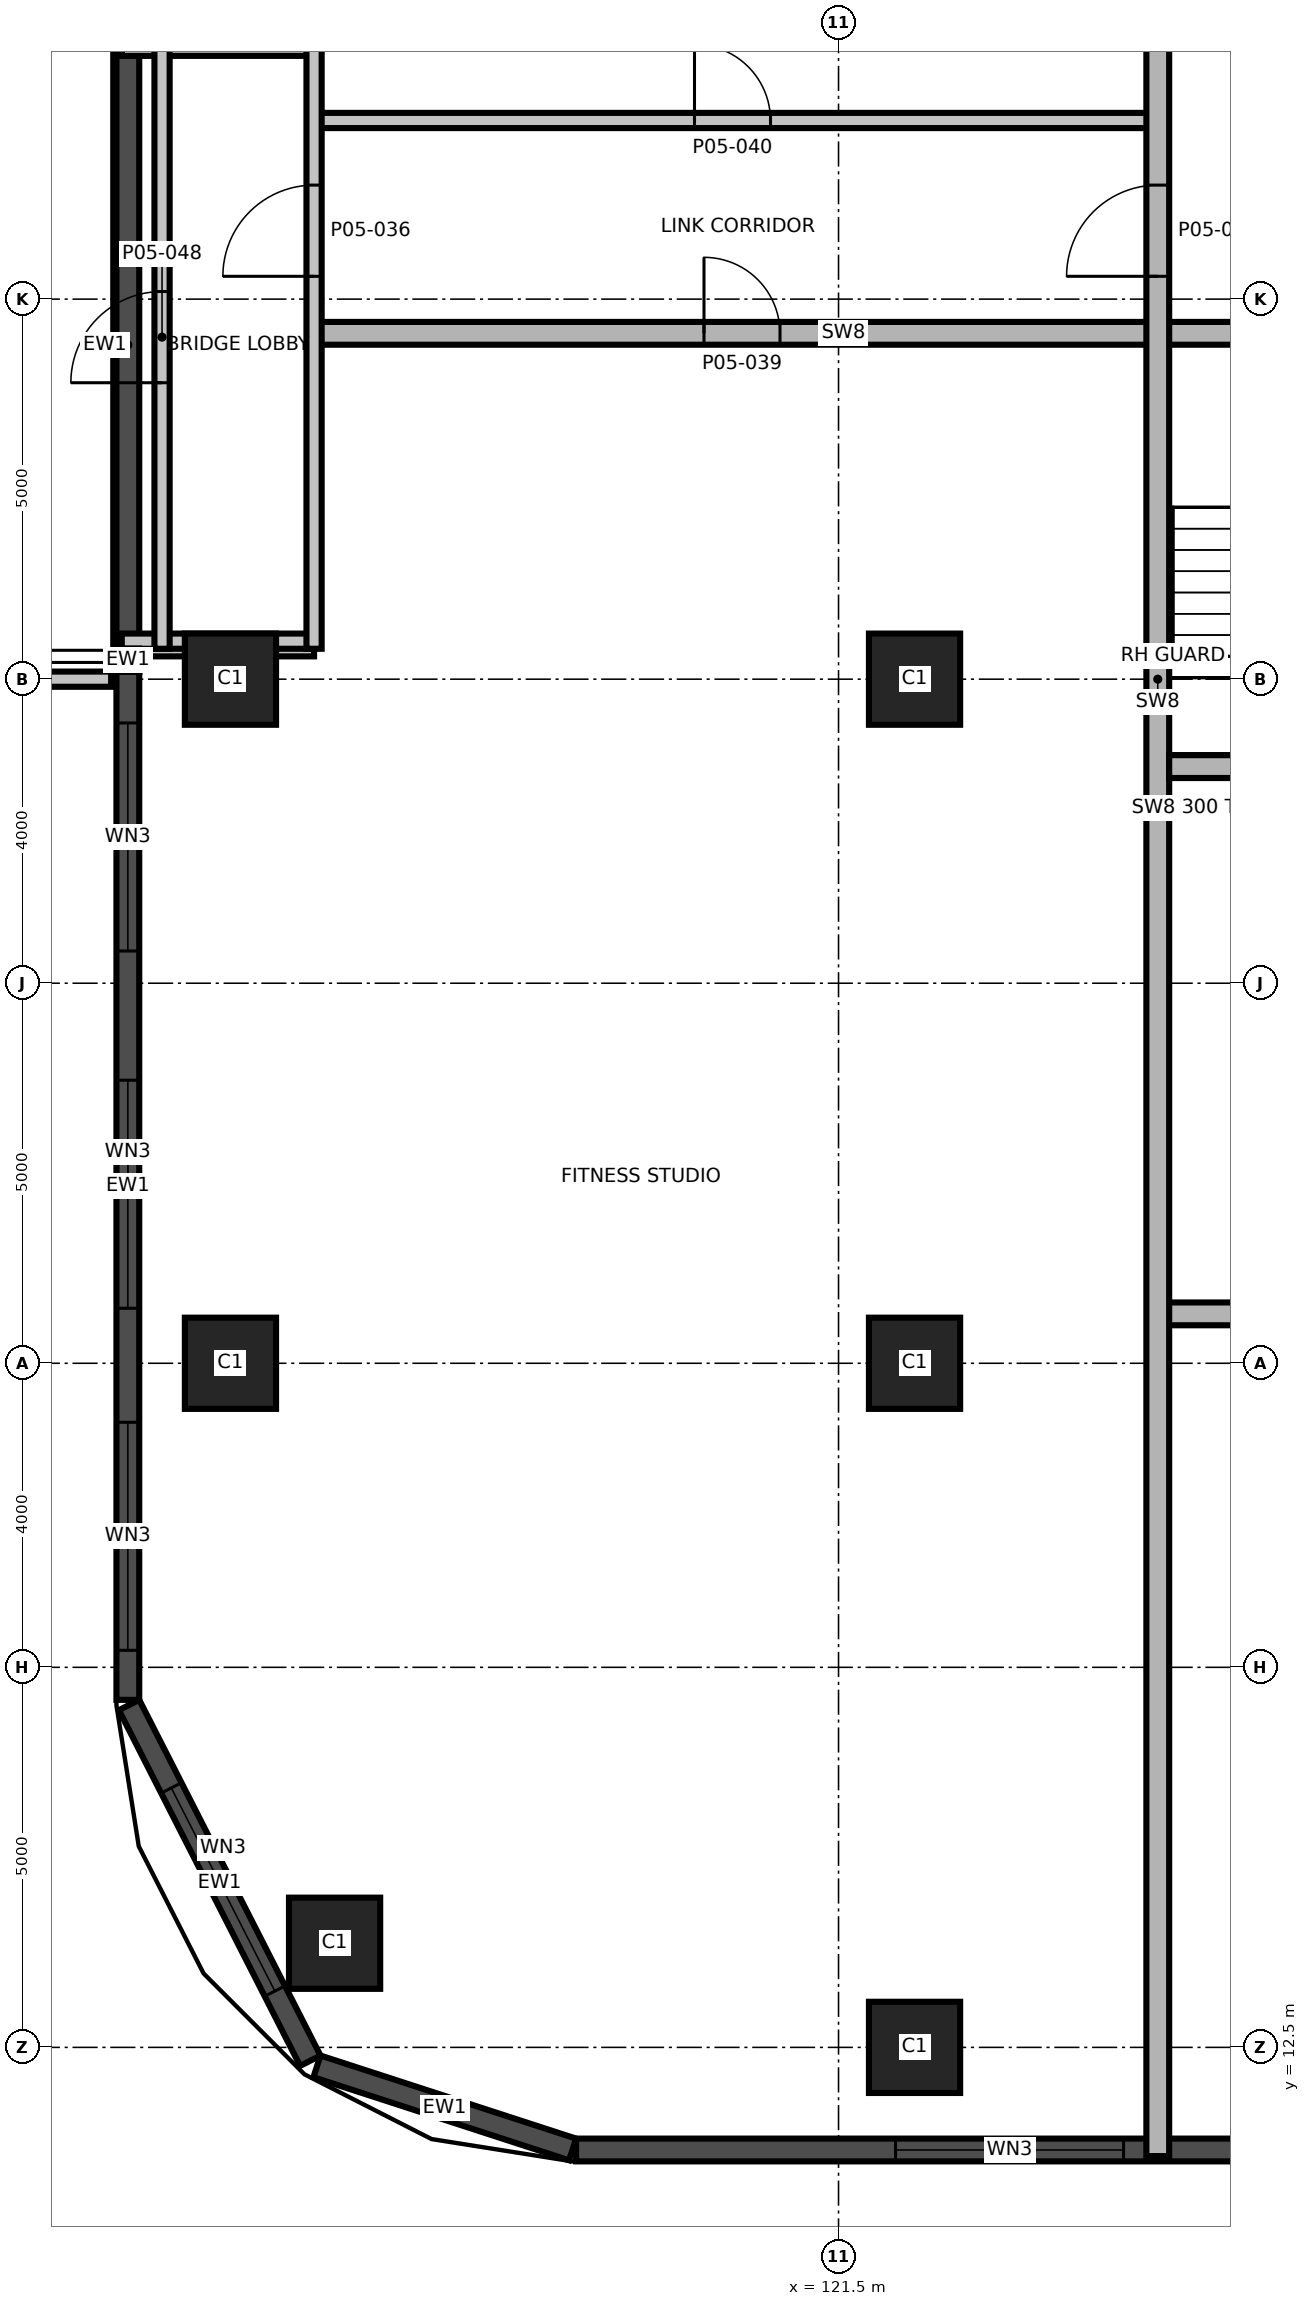
"""IFC4 building model, lengths in metres.
Left out: names, types, materials, properties, quantities, classifications, styles, units other than length and angle.
Written with IfcOpenShell. Run it as: python <this file> out.ifc"""

import sys

from ifc_helpers import new_model, si_unit, direction, frame, frame_2d, origin, origin_2d, place, context, subcontext, project, spatial, rectangle, extrude, element, fill, save


model = new_model("IFC4")
c1 = context("Model", 3, precision=1e-05, world=origin(), true_north=direction((0.0, 1.0)))
c2 = subcontext(c1, "Body", "Model", "MODEL_VIEW")
j1 = project(units=[si_unit("LENGTHUNIT", "METRE"), si_unit("PLANEANGLEUNIT", "RADIAN")], contexts=[c1])
p1 = place(None, origin())
s1 = spatial("IfcSite", under=j1, at=p1, CompositionType="ELEMENT")
p2 = place(p1, origin())
s2 = spatial("IfcBuilding", under=s1, at=p2, CompositionType="ELEMENT")
p3 = place(p2, frame((0.0, 0.0, 28.5)))
s3 = spatial("IfcBuildingStorey", under=s2, at=p3, CompositionType="ELEMENT", Elevation=28.5)
for number, where, z_axis, x_axis in (
    (1, (122.5, 12.5, 0.0), (0.0, 0.0, 1.0), (1.0, 0.0, 0.0)),
    (2, (114.87, 13.87, 0.0), (0.0, 0.0, 1.0), (1.0, 0.0, 0.0)),
    (3, (113.5, 21.5, 0.0), (0.0, 0.0, 1.0), (1.0, 0.0, 0.0)),
    (4, (122.5, 21.5, 0.0), (0.0, 0.0, 1.0), (1.0, 0.0, 0.0)),
    (5, (113.5, 30.5, 0.0), (0.0, 0.0, 1.0), (1.0, 0.0, 0.0)),
    (6, (122.5, 30.5, 0.0), (0.0, 0.0, 1.0), (1.0, 0.0, 0.0)),
):
    element("IfcColumn", number, at=place(p3, frame(where, z_axis=z_axis, x_axis=x_axis)), inside=s3, PredefinedType="COLUMN", context=c2, shape_type="SweptSolid", body=[
        extrude(rectangle(XDim=1.2, YDim=1.2, at=origin_2d()), origin(), (0.0, 0.0, 1.0), 5.0),
    ])
p4 = place(p3, frame((112.166, 17.004, 0.0), z_axis=(0.0, 0.0, 1.0), x_axis=(0.454006562826, -0.890998339455, 0.0)))
e7 = element("IfcWall", 7, at=p4, inside=s3, PredefinedType="SOLIDWALL", context=c2, shape_type="SweptSolid", body=[
    extrude(rectangle(XDim=5.252, YDim=0.3, at=frame_2d((2.626, 0.0))), origin(), (0.0, 0.0, 1.0), 4.7),
])
p5 = place(p4, frame((1.224, 0.0, 0.9)))
e8 = element("IfcOpeningElement", 8, at=p5, cuts=e7, PredefinedType="OPENING", context=c2, shape_type="SweptSolid", body=[
    extrude(rectangle(XDim=3.0, YDim=2.4, at=frame_2d((1.5, 1.2))), frame((0.0, 0.16, 0.0), z_axis=(0.0, -1.0, 0.0), x_axis=(1.0, 0.0, 0.0)), (0.0, 0.0, 1.0), 0.32),
])
p6 = place(p3, frame((114.638, 12.25, 0.0), z_axis=(0.0, 0.0, 1.0), x_axis=(0.951038127287, -0.309073584194, 0.0)))
e9 = element("IfcWall", 9, at=p6, inside=s3, PredefinedType="SOLIDWALL", context=c2, shape_type="SweptSolid", body=[
    extrude(rectangle(XDim=3.536, YDim=0.3, at=frame_2d((1.768, 0.0))), origin(), (0.0, 0.0, 1.0), 4.7),
])
p7 = place(p3, frame((118.048, 11.15, 0.0), z_axis=(0.0, 0.0, 1.0), x_axis=(1.0, 0.0, 0.0)))
e10 = element("IfcWall", 10, at=p7, inside=s3, PredefinedType="SOLIDWALL", context=c2, shape_type="SweptSolid", body=[
    extrude(rectangle(XDim=35.88, YDim=0.3, at=frame_2d((17.94, 0.0))), origin(), (0.0, 0.0, 1.0), 4.7),
])
p8 = place(p7, frame((4.202, 0.0, 0.9)))
e11 = element("IfcOpeningElement", 11, at=p8, cuts=e10, PredefinedType="OPENING", context=c2, shape_type="SweptSolid", body=[
    extrude(rectangle(XDim=3.0, YDim=2.4, at=frame_2d((1.5, 1.2))), frame((0.0, 0.16, 0.0), z_axis=(0.0, -1.0, 0.0), x_axis=(1.0, 0.0, 0.0)), (0.0, 0.0, 1.0), 0.32),
])
p9 = place(p7, frame((8.702, 0.0, 0.9)))
e12 = element("IfcOpeningElement", 12, at=p9, cuts=e10, PredefinedType="OPENING", context=c2, shape_type="SweptSolid", body=[
    extrude(rectangle(XDim=3.0, YDim=2.4, at=frame_2d((1.5, 1.2))), frame((0.0, 0.16, 0.0), z_axis=(0.0, -1.0, 0.0), x_axis=(1.0, 0.0, 0.0)), (0.0, 0.0, 1.0), 0.32),
])
p10 = place(p7, frame((17.702, 0.0, 0.9)))
e13 = element("IfcOpeningElement", 13, at=p10, cuts=e10, PredefinedType="OPENING", context=c2, shape_type="SweptSolid", body=[
    extrude(rectangle(XDim=3.0, YDim=2.4, at=frame_2d((1.5, 1.2))), frame((0.0, 0.16, 0.0), z_axis=(0.0, -1.0, 0.0), x_axis=(1.0, 0.0, 0.0)), (0.0, 0.0, 1.0), 0.32),
])
p11 = place(p7, frame((31.726, 0.0, 0.9)))
e14 = element("IfcOpeningElement", 14, at=p11, cuts=e10, PredefinedType="OPENING", context=c2, shape_type="SweptSolid", body=[
    extrude(rectangle(XDim=3.0, YDim=2.4, at=frame_2d((1.5, 1.2))), frame((0.0, 0.16, 0.0), z_axis=(0.0, -1.0, 0.0), x_axis=(1.0, 0.0, 0.0)), (0.0, 0.0, 1.0), 0.32),
])
p12 = place(p3, frame((112.15, 38.9, 3.15), z_axis=(0.0, 0.0, 1.0), x_axis=(0.0, -1.0, 0.0)))
e15 = element("IfcWall", 15, at=p12, inside=s3, PredefinedType="SOLIDWALL", context=c2, shape_type="SweptSolid", body=[
    extrude(rectangle(XDim=8.0, YDim=0.3, at=frame_2d((4.0, 0.0))), origin(), (0.0, 0.0, 1.0), 1.55),
])
p13 = place(p3, frame((112.15, 30.6, 0.0), z_axis=(0.0, 0.0, 1.0), x_axis=(0.0, -1.0, 0.0)))
e16 = element("IfcWall", 16, at=p13, inside=s3, PredefinedType="SOLIDWALL", context=c2, shape_type="SweptSolid", body=[
    extrude(rectangle(XDim=13.528, YDim=0.3, at=frame_2d((6.764, 0.0))), origin(), (0.0, 0.0, 1.0), 4.7),
])
p14 = place(p13, frame((0.676, 0.0, 0.9)))
e17 = element("IfcOpeningElement", 17, at=p14, cuts=e16, PredefinedType="OPENING", context=c2, shape_type="SweptSolid", body=[
    extrude(rectangle(XDim=3.0, YDim=2.4, at=frame_2d((1.5, 1.2))), frame((0.0, 0.16, 0.0), z_axis=(0.0, -1.0, 0.0), x_axis=(1.0, 0.0, 0.0)), (0.0, 0.0, 1.0), 0.32),
])
p15 = place(p13, frame((5.376, 0.0, 0.9)))
e18 = element("IfcOpeningElement", 18, at=p15, cuts=e16, PredefinedType="OPENING", context=c2, shape_type="SweptSolid", body=[
    extrude(rectangle(XDim=3.0, YDim=2.4, at=frame_2d((1.5, 1.2))), frame((0.0, 0.16, 0.0), z_axis=(0.0, -1.0, 0.0), x_axis=(1.0, 0.0, 0.0)), (0.0, 0.0, 1.0), 0.32),
])
p16 = place(p13, frame((9.876, 0.0, 0.9)))
e19 = element("IfcOpeningElement", 19, at=p16, cuts=e16, PredefinedType="OPENING", context=c2, shape_type="SweptSolid", body=[
    extrude(rectangle(XDim=3.0, YDim=2.4, at=frame_2d((1.5, 1.2))), frame((0.0, 0.16, 0.0), z_axis=(0.0, -1.0, 0.0), x_axis=(1.0, 0.0, 0.0)), (0.0, 0.0, 1.0), 0.32),
])
p17 = place(p3, frame((125.75, 22.15, 0.0), z_axis=(0.0, 0.0, 1.0), x_axis=(1.0, 0.0, 0.0)))
e20 = element("IfcWall", 20, at=p17, inside=s3, PredefinedType="SHEAR", context=c2, shape_type="SweptSolid", body=[
    extrude(rectangle(XDim=21.5, YDim=0.3, at=frame_2d((10.75, 0.0))), origin(), (0.0, 0.0, 1.0), 3.8),
])
p18 = place(p17, frame((17.0, 0.0, 0.0)))
e21 = element("IfcOpeningElement", 21, at=p18, cuts=e20, PredefinedType="OPENING", context=c2, shape_type="SweptSolid", body=[
    extrude(rectangle(XDim=1.0, YDim=2.1, at=frame_2d((0.5, 1.05))), frame((0.0, 0.16, 0.0), z_axis=(0.0, -1.0, 0.0), x_axis=(1.0, 0.0, 0.0)), (0.0, 0.0, 1.0), 0.32),
])
p19 = place(p17, frame((3.064, 0.0, 0.0)))
e22 = element("IfcOpeningElement", 22, at=p19, cuts=e20, PredefinedType="OPENING", context=c2, shape_type="SweptSolid", body=[
    extrude(rectangle(XDim=1.0, YDim=2.1, at=frame_2d((0.5, 1.05))), frame((0.0, 0.16, 0.0), z_axis=(0.0, -1.0, 0.0), x_axis=(1.0, 0.0, 0.0)), (0.0, 0.0, 1.0), 0.32),
])
p20 = place(p17, frame((9.348, 0.0, 0.0)))
e23 = element("IfcOpeningElement", 23, at=p20, cuts=e20, PredefinedType="OPENING", context=c2, shape_type="SweptSolid", body=[
    extrude(rectangle(XDim=1.0, YDim=2.1, at=frame_2d((0.5, 1.05))), frame((0.0, 0.16, 0.0), z_axis=(0.0, -1.0, 0.0), x_axis=(1.0, 0.0, 0.0)), (0.0, 0.0, 1.0), 0.32),
])
p21 = place(p3, frame((125.7, 29.35, 0.0), z_axis=(0.0, 0.0, 1.0), x_axis=(1.0, 0.0, 0.0)))
e24 = element("IfcWall", 24, at=p21, inside=s3, PredefinedType="SHEAR", context=c2, shape_type="SweptSolid", body=[
    extrude(rectangle(XDim=2.83, YDim=0.3, at=frame_2d((1.415, 0.0))), origin(), (0.0, 0.0, 1.0), 3.8),
])
p22 = place(p21, frame((0.975, 0.0, 0.0)))
e25 = element("IfcOpeningElement", 25, at=p22, cuts=e24, PredefinedType="OPENING", context=c2, shape_type="SweptSolid", body=[
    extrude(rectangle(XDim=1.2, YDim=2.1, at=frame_2d((0.6, 1.05))), frame((0.0, 0.16, 0.0), z_axis=(0.0, -1.0, 0.0), x_axis=(1.0, 0.0, 0.0)), (0.0, 0.0, 1.0), 0.32),
])
p23 = place(p3, frame((105.07, 30.5, 0.0), z_axis=(0.0, 0.0, 1.0), x_axis=(1.0, 0.0, 0.0)))
e26 = element("IfcWall", 26, at=p23, inside=s3, PredefinedType="PARTITIONING", context=c2, shape_type="SweptSolid", body=[
    extrude(rectangle(XDim=6.86, YDim=0.2, at=frame_2d((3.43, 0.0))), origin(), (0.0, 0.0, 1.0), 4.7),
])
p24 = place(p3, frame((112.1, 30.9, 0.0), z_axis=(0.0, 0.0, 1.0), x_axis=(1.0, 0.0, 0.0)))
e27 = element("IfcWall", 27, at=p24, inside=s3, PredefinedType="PARTITIONING", context=c2, shape_type="SweptSolid", body=[
    extrude(rectangle(XDim=2.5, YDim=0.2, at=frame_2d((1.25, 0.0))), origin(), (0.0, 0.0, 1.0), 2.7),
])
p25 = place(p3, frame((112.07, 31.0, 0.0), z_axis=(0.0, 0.0, 1.0), x_axis=(1.0, 0.0, 0.0)))
e28 = element("IfcWall", 28, at=p25, inside=s3, PredefinedType="PARTITIONING", context=c2, shape_type="SweptSolid", body=[
    extrude(rectangle(XDim=2.53, YDim=0.2, at=frame_2d((1.265, 0.0))), origin(), (0.0, 0.0, 1.0), 4.7),
])
p26 = place(p3, frame((114.6, 35.05, 0.0), z_axis=(0.0, 0.0, 1.0), x_axis=(1.0, 0.0, 0.0)))
e29 = element("IfcWall", 29, at=p26, inside=s3, PredefinedType="SHEAR", context=c2, shape_type="SweptSolid", body=[
    extrude(rectangle(XDim=13.93, YDim=0.3, at=frame_2d((6.965, 0.0))), origin(), (0.0, 0.0, 1.0), 4.65),
])
p27 = place(p26, frame((5.13, 0.0, 0.0)))
e30 = element("IfcOpeningElement", 30, at=p27, cuts=e29, PredefinedType="OPENING", context=c2, shape_type="SweptSolid", body=[
    extrude(rectangle(XDim=1.0, YDim=2.1, at=frame_2d((0.5, 1.05))), frame((0.0, 0.16, 0.0), z_axis=(0.0, -1.0, 0.0), x_axis=(1.0, 0.0, 0.0)), (0.0, 0.0, 1.0), 0.32),
])
p28 = place(p3, frame((114.6, 37.85, 0.0), z_axis=(0.0, 0.0, 1.0), x_axis=(1.0, 0.0, 0.0)))
e31 = element("IfcWall", 31, at=p28, inside=s3, PredefinedType="PARTITIONING", context=c2, shape_type="SweptSolid", body=[
    extrude(rectangle(XDim=11.15, YDim=0.2, at=frame_2d((5.575, 0.0))), origin(), (0.0, 0.0, 1.0), 3.8),
])
p29 = place(p28, frame((5.005, 0.0, 0.0)))
e32 = element("IfcOpeningElement", 32, at=p29, cuts=e31, PredefinedType="OPENING", context=c2, shape_type="SweptSolid", body=[
    extrude(rectangle(XDim=1.0, YDim=2.1, at=frame_2d((0.5, 1.05))), frame((0.0, 0.11, 0.0), z_axis=(0.0, -1.0, 0.0), x_axis=(1.0, 0.0, 0.0)), (0.0, 0.0, 1.0), 0.22),
])
p30 = place(p3, frame((112.07, 38.8, 0.0), z_axis=(0.0, 0.0, 1.0), x_axis=(1.0, 0.0, 0.0)))
e33 = element("IfcWall", 33, at=p30, inside=s3, PredefinedType="PARTITIONING", context=c2, shape_type="SweptSolid", body=[
    extrude(rectangle(XDim=2.53, YDim=0.2, at=frame_2d((1.265, 0.0))), origin(), (0.0, 0.0, 1.0), 4.7),
])
p31 = place(p3, frame((112.6, 30.9, 0.0), z_axis=(0.0, 0.0, 1.0), x_axis=(0.0, 1.0, 0.0)))
e34 = element("IfcWall", 34, at=p31, inside=s3, PredefinedType="PARTITIONING", context=c2, shape_type="SweptSolid", body=[
    extrude(rectangle(XDim=8.0, YDim=0.2, at=frame_2d((4.0, 0.0))), origin(), (0.0, 0.0, 1.0), 4.7),
])
p32 = place(p31, frame((3.5, 0.0, 0.0)))
e35 = element("IfcOpeningElement", 35, at=p32, cuts=e34, PredefinedType="OPENING", context=c2, shape_type="SweptSolid", body=[
    extrude(rectangle(XDim=1.2, YDim=2.1, at=frame_2d((0.6, 1.05))), frame((0.0, 0.11, 0.0), z_axis=(0.0, -1.0, 0.0), x_axis=(1.0, 0.0, 0.0)), (0.0, 0.0, 1.0), 0.22),
])
p33 = place(p3, frame((114.6, 30.9, 0.0), z_axis=(0.0, 0.0, 1.0), x_axis=(0.0, 1.0, 0.0)))
e36 = element("IfcWall", 36, at=p33, inside=s3, PredefinedType="PARTITIONING", context=c2, shape_type="SweptSolid", body=[
    extrude(rectangle(XDim=8.0, YDim=0.2, at=frame_2d((4.0, 0.0))), origin(), (0.0, 0.0, 1.0), 4.7),
])
p34 = place(p33, frame((4.9, 0.0, 0.0)))
e37 = element("IfcOpeningElement", 37, at=p34, cuts=e36, PredefinedType="OPENING", context=c2, shape_type="SweptSolid", body=[
    extrude(rectangle(XDim=1.2, YDim=2.1, at=frame_2d((0.6, 1.05))), frame((0.0, 0.11, 0.0), z_axis=(0.0, -1.0, 0.0), x_axis=(1.0, 0.0, 0.0)), (0.0, 0.0, 1.0), 0.22),
])
p35 = place(p3, frame((125.7, 11.07, 0.0), z_axis=(0.0, 0.0, 1.0), x_axis=(0.0, 1.0, 0.0)))
e38 = element("IfcWall", 38, at=p35, inside=s3, PredefinedType="SHEAR", context=c2, shape_type="SweptSolid", body=[
    extrude(rectangle(XDim=38.86, YDim=0.3, at=frame_2d((19.43, 0.0))), origin(), (0.0, 0.0, 1.0), 4.65),
])
p36 = place(p35, frame((24.73, 0.0, 0.0)))
e39 = element("IfcOpeningElement", 39, at=p36, cuts=e38, PredefinedType="OPENING", context=c2, shape_type="SweptSolid", body=[
    extrude(rectangle(XDim=1.2, YDim=2.1, at=frame_2d((0.6, 1.05))), frame((0.0, 0.16, 0.0), z_axis=(0.0, -1.0, 0.0), x_axis=(1.0, 0.0, 0.0)), (0.0, 0.0, 1.0), 0.32),
])
p37 = place(p3, frame((112.15, 30.6, 0.0), z_axis=(0.0, 0.0, 1.0), x_axis=(0.0, 1.0, 0.0)))
e40 = element("IfcWall", 40, at=p37, inside=s3, PredefinedType="SOLIDWALL", context=c2, shape_type="SweptSolid", body=[
    extrude(rectangle(XDim=0.3, YDim=0.3, at=frame_2d((0.15, 0.0))), origin(), (0.0, 0.0, 1.0), 2.7),
])
p38 = place(p3, frame((112.15, 30.6, 3.15), z_axis=(0.0, 0.0, 1.0), x_axis=(0.0, 1.0, 0.0)))
e41 = element("IfcWall", 41, at=p38, inside=s3, PredefinedType="SOLIDWALL", context=c2, shape_type="SweptSolid", body=[
    extrude(rectangle(XDim=0.3, YDim=0.3, at=frame_2d((0.15, 0.0))), origin(), (0.0, 0.0, 1.0), 1.55),
])
p39 = place(p3, frame((125.85, 29.35, 3.8), z_axis=(0.0, 0.0, 1.0), x_axis=(1.0, 0.0, 0.0)))
e42 = element("IfcWall", 42, at=p39, inside=s3, PredefinedType="SHEAR", context=c2, shape_type="SweptSolid", body=[
    extrude(rectangle(XDim=2.68, YDim=0.3, at=frame_2d((1.34, 0.0))), origin(), (0.0, 0.0, 1.0), 0.9),
])
p40 = place(p5, origin())
e43 = element("IfcWindow", 43, at=p40, inside=s3, PartitioningType="SINGLE_PANEL", PredefinedType="WINDOW", context=c2, shape_type="SweptSolid", body=[
    extrude(rectangle(XDim=3.0, YDim=2.4, at=frame_2d((1.5, 1.2))), frame((0.0, 0.03, 0.0), z_axis=(0.0, -1.0, 0.0), x_axis=(1.0, 0.0, 0.0)), (0.0, 0.0, 1.0), 0.06),
])
fill(e8, e43)
p41 = place(p8, origin())
e44 = element("IfcWindow", 44, at=p41, inside=s3, PartitioningType="SINGLE_PANEL", PredefinedType="WINDOW", context=c2, shape_type="SweptSolid", body=[
    extrude(rectangle(XDim=3.0, YDim=2.4, at=frame_2d((1.5, 1.2))), frame((0.0, 0.03, 0.0), z_axis=(0.0, -1.0, 0.0), x_axis=(1.0, 0.0, 0.0)), (0.0, 0.0, 1.0), 0.06),
])
fill(e11, e44)
p42 = place(p14, origin())
e45 = element("IfcWindow", 45, at=p42, inside=s3, PartitioningType="SINGLE_PANEL", PredefinedType="WINDOW", context=c2, shape_type="SweptSolid", body=[
    extrude(rectangle(XDim=3.0, YDim=2.4, at=frame_2d((1.5, 1.2))), frame((0.0, 0.03, 0.0), z_axis=(0.0, -1.0, 0.0), x_axis=(1.0, 0.0, 0.0)), (0.0, 0.0, 1.0), 0.06),
])
fill(e17, e45)
p43 = place(p15, origin())
e46 = element("IfcWindow", 46, at=p43, inside=s3, PartitioningType="SINGLE_PANEL", PredefinedType="WINDOW", context=c2, shape_type="SweptSolid", body=[
    extrude(rectangle(XDim=3.0, YDim=2.4, at=frame_2d((1.5, 1.2))), frame((0.0, 0.03, 0.0), z_axis=(0.0, -1.0, 0.0), x_axis=(1.0, 0.0, 0.0)), (0.0, 0.0, 1.0), 0.06),
])
fill(e18, e46)
p44 = place(p16, origin())
e47 = element("IfcWindow", 47, at=p44, inside=s3, PartitioningType="SINGLE_PANEL", PredefinedType="WINDOW", context=c2, shape_type="SweptSolid", body=[
    extrude(rectangle(XDim=3.0, YDim=2.4, at=frame_2d((1.5, 1.2))), frame((0.0, 0.03, 0.0), z_axis=(0.0, -1.0, 0.0), x_axis=(1.0, 0.0, 0.0)), (0.0, 0.0, 1.0), 0.06),
])
fill(e19, e47)
p45 = place(p34, origin())
e48 = element("IfcDoor", 48, at=p45, inside=s3, OperationType="SINGLE_SWING_RIGHT", PredefinedType="DOOR", context=c2, shape_type="SweptSolid", body=[
    extrude(rectangle(XDim=1.2, YDim=2.1, at=frame_2d((0.6, 1.05))), frame((0.0, 0.025, 0.0), z_axis=(0.0, -1.0, 0.0), x_axis=(1.0, 0.0, 0.0)), (0.0, 0.0, 1.0), 0.05),
])
fill(e37, e48)
p46 = place(p36, origin())
e49 = element("IfcDoor", 49, at=p46, inside=s3, OperationType="SINGLE_SWING_LEFT", PredefinedType="DOOR", context=c2, shape_type="SweptSolid", body=[
    extrude(rectangle(XDim=1.2, YDim=2.1, at=frame_2d((0.6, 1.05))), frame((0.0, 0.025, 0.0), z_axis=(0.0, -1.0, 0.0), x_axis=(1.0, 0.0, 0.0)), (0.0, 0.0, 1.0), 0.05),
])
fill(e39, e49)
p47 = place(p27, origin())
e50 = element("IfcDoor", 50, at=p47, inside=s3, OperationType="SINGLE_SWING_LEFT", PredefinedType="DOOR", context=c2, shape_type="SweptSolid", body=[
    extrude(rectangle(XDim=1.0, YDim=2.1, at=frame_2d((0.5, 1.05))), frame((0.0, 0.025, 0.0), z_axis=(0.0, -1.0, 0.0), x_axis=(1.0, 0.0, 0.0)), (0.0, 0.0, 1.0), 0.05),
])
fill(e30, e50)
p48 = place(p29, origin())
e51 = element("IfcDoor", 51, at=p48, inside=s3, OperationType="SINGLE_SWING_RIGHT", PredefinedType="DOOR", context=c2, shape_type="SweptSolid", body=[
    extrude(rectangle(XDim=1.0, YDim=2.1, at=frame_2d((0.5, 1.05))), frame((0.0, 0.025, 0.0), z_axis=(0.0, -1.0, 0.0), x_axis=(1.0, 0.0, 0.0)), (0.0, 0.0, 1.0), 0.05),
])
fill(e32, e51)
p49 = place(p32, origin())
e52 = element("IfcDoor", 52, at=p49, inside=s3, OperationType="SINGLE_SWING_RIGHT", PredefinedType="DOOR", context=c2, shape_type="SweptSolid", body=[
    extrude(rectangle(XDim=1.2, YDim=2.1, at=frame_2d((0.6, 1.05))), frame((0.0, 0.025, 0.0), z_axis=(0.0, -1.0, 0.0), x_axis=(1.0, 0.0, 0.0)), (0.0, 0.0, 1.0), 0.05),
])
fill(e35, e52)
save(model, sys.argv[1])
